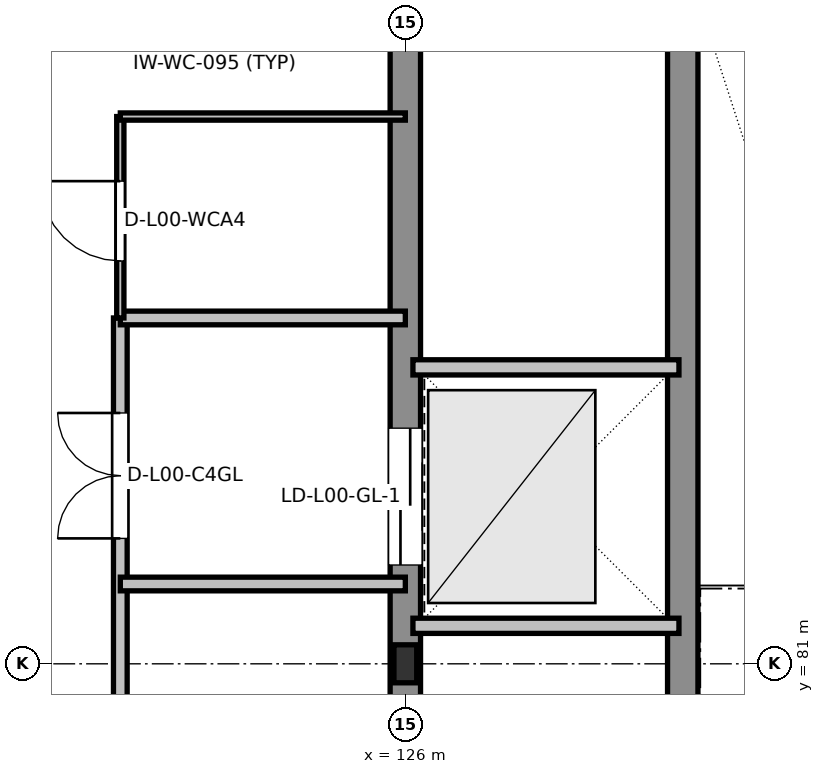
"""IFC4 building model, lengths in metres.
Left out: names, types, materials, properties, quantities, classifications, styles, units other than length and angle.
Written with IfcOpenShell. Run it as: python <this file> out.ifc"""

import sys

from ifc_helpers import new_model, si_unit, direction, frame, frame_2d, origin, origin_2d, place, context, subcontext, project, spatial, rectangle, i_section, extrude, element, fill, save


model = new_model("IFC4")
c1 = context("Model", 3, precision=1e-05, world=origin(), true_north=direction((0.0, 1.0)))
c2 = subcontext(c1, "Body", "Model", "MODEL_VIEW")
j1 = project(units=[si_unit("LENGTHUNIT", "METRE"), si_unit("PLANEANGLEUNIT", "RADIAN")], contexts=[c1])
p1 = place(None, origin())
s1 = spatial("IfcSite", under=j1, at=p1, CompositionType="ELEMENT")
p2 = place(p1, origin())
s2 = spatial("IfcBuilding", under=s1, at=p2, CompositionType="ELEMENT")
p3 = place(p2, origin())
s3 = spatial("IfcBuildingStorey", under=s2, at=p3, CompositionType="ELEMENT", Elevation=0.0)
p4 = place(p3, frame((126.0, 81.0, 0.0), z_axis=(0.0, 0.0, 1.0), x_axis=(1.0, 0.0, 0.0)))
e1 = element("IfcColumn", 1, at=p4, inside=s3, PredefinedType="COLUMN", context=c2, shape_type="SweptSolid", body=[
    extrude(i_section(OverallWidth=0.3, OverallDepth=0.5, WebThickness=0.014, FlangeThickness=0.028, at=origin_2d()), origin(), (0.0, 0.0, 1.0), 5.4),
])
p5 = place(p3, frame((126.0, 90.0, 0.0), z_axis=(0.0, 0.0, 1.0), x_axis=(0.0, -1.0, 0.0)))
e2 = element("IfcWall", 2, at=p5, inside=s3, PredefinedType="SHEAR", context=c2, shape_type="SweptSolid", body=[
    extrude(rectangle(XDim=18.0, YDim=0.4, at=frame_2d((9.0, 0.0))), origin(), (0.0, 0.0, 1.0), 5.16),
])
p6 = place(p5, frame((16.1, 0.0, 0.0)))
e3 = element("IfcOpeningElement", 3, at=p6, cuts=e2, PredefinedType="OPENING", context=c2, shape_type="SweptSolid", body=[
    extrude(rectangle(XDim=1.1, YDim=2.16, at=frame_2d((0.55, 1.08))), frame((0.0, 0.21, 0.0), z_axis=(0.0, -1.0, 0.0), x_axis=(1.0, 0.0, 0.0)), (0.0, 0.0, 1.0), 0.42),
])
p7 = place(p5, frame((13.45, 0.0, 0.0)))
e4 = element("IfcOpeningElement", 4, at=p7, cuts=e2, PredefinedType="OPENING", context=c2, shape_type="SweptSolid", body=[
    extrude(rectangle(XDim=1.2, YDim=2.2, at=frame_2d((0.6, 1.1))), frame((0.0, 0.21, 0.0), z_axis=(0.0, -1.0, 0.0), x_axis=(1.0, 0.0, 0.0)), (0.0, 0.0, 1.0), 0.42),
])
p8 = place(p5, frame((10.65, 0.0, 0.0)))
e5 = element("IfcOpeningElement", 5, at=p8, cuts=e2, PredefinedType="OPENING", context=c2, shape_type="SweptSolid", body=[
    extrude(rectangle(XDim=1.2, YDim=2.2, at=frame_2d((0.6, 1.1))), frame((0.0, 0.21, 0.0), z_axis=(0.0, -1.0, 0.0), x_axis=(1.0, 0.0, 0.0)), (0.0, 0.0, 1.0), 0.42),
])
p9 = place(p5, frame((5.9, 0.0, 0.0)))
e6 = element("IfcOpeningElement", 6, at=p9, cuts=e2, PredefinedType="OPENING", context=c2, shape_type="SweptSolid", body=[
    extrude(rectangle(XDim=1.8, YDim=2.35, at=frame_2d((0.9, 1.175))), frame((0.0, 0.21, 0.0), z_axis=(0.0, -1.0, 0.0), x_axis=(1.0, 0.0, 0.0)), (0.0, 0.0, 1.0), 0.42),
])
p10 = place(p3, frame((129.65, 72.0, 0.0), z_axis=(0.0, 0.0, 1.0), x_axis=(0.0, 1.0, 0.0)))
e7 = element("IfcWall", 7, at=p10, inside=s3, PredefinedType="SHEAR", context=c2, shape_type="SweptSolid", body=[
    extrude(rectangle(XDim=18.0, YDim=0.4, at=frame_2d((9.0, 0.0))), origin(), (0.0, 0.0, 1.0), 5.16),
])
p11 = place(p10, frame((0.7, 0.0, 0.0)))
e8 = element("IfcOpeningElement", 8, at=p11, cuts=e7, PredefinedType="OPENING", context=c2, shape_type="SweptSolid", body=[
    extrude(rectangle(XDim=1.1, YDim=2.16, at=frame_2d((0.55, 1.08))), frame((0.0, 0.21, 0.0), z_axis=(0.0, -1.0, 0.0), x_axis=(1.0, 0.0, 0.0)), (0.0, 0.0, 1.0), 0.42),
])
for number, where, z_axis, x_axis in (
    (9, (126.1, 81.5, 0.0), (0.0, 0.0, 1.0), (1.0, 0.0, 0.0)),
    (10, (126.1, 84.9, 0.0), (0.0, 0.0, 1.0), (1.0, 0.0, 0.0)),
):
    element("IfcWall", number, at=place(p3, frame(where, z_axis=z_axis, x_axis=x_axis)), inside=s3, PredefinedType="PARTITIONING", context=c2, shape_type="SweptSolid", body=[
        extrude(rectangle(XDim=3.5, YDim=0.2, at=frame_2d((1.75, 0.0))), origin(), (0.0, 0.0, 1.0), 5.16),
    ])
p12 = place(p3, frame((122.25, 72.0, 0.0), z_axis=(0.0, 0.0, 1.0), x_axis=(0.0, 1.0, 0.0)))
e11 = element("IfcWall", 11, at=p12, inside=s3, PredefinedType="PARTITIONING", context=c2, shape_type="SweptSolid", body=[
    extrude(rectangle(XDim=13.55, YDim=0.18, at=frame_2d((6.775, 0.0))), origin(), (0.0, 0.0, 1.0), 5.16),
])
p13 = place(p12, frame((0.75, 0.0, 0.0)))
e12 = element("IfcOpeningElement", 12, at=p13, cuts=e11, PredefinedType="OPENING", context=c2, shape_type="SweptSolid", body=[
    extrude(rectangle(XDim=1.1, YDim=2.16, at=frame_2d((0.55, 1.08))), frame((0.0, 0.1, 0.0), z_axis=(0.0, -1.0, 0.0), x_axis=(1.0, 0.0, 0.0)), (0.0, 0.0, 1.0), 0.2),
])
p14 = place(p12, frame((3.2, 0.0, 0.0)))
e13 = element("IfcOpeningElement", 13, at=p14, cuts=e11, PredefinedType="OPENING", context=c2, shape_type="SweptSolid", body=[
    extrude(rectangle(XDim=1.4, YDim=2.2, at=frame_2d((0.7, 1.1))), frame((0.0, 0.1, 0.0), z_axis=(0.0, -1.0, 0.0), x_axis=(1.0, 0.0, 0.0)), (0.0, 0.0, 1.0), 0.2),
])
p15 = place(p12, frame((6.65, 0.0, 0.0)))
e14 = element("IfcOpeningElement", 14, at=p15, cuts=e11, PredefinedType="OPENING", context=c2, shape_type="SweptSolid", body=[
    extrude(rectangle(XDim=1.4, YDim=2.2, at=frame_2d((0.7, 1.1))), frame((0.0, 0.1, 0.0), z_axis=(0.0, -1.0, 0.0), x_axis=(1.0, 0.0, 0.0)), (0.0, 0.0, 1.0), 0.2),
])
p16 = place(p12, frame((10.65, 0.0, 0.0)))
e15 = element("IfcOpeningElement", 15, at=p16, cuts=e11, PredefinedType="OPENING", context=c2, shape_type="SweptSolid", body=[
    extrude(rectangle(XDim=1.65, YDim=2.25, at=frame_2d((0.825, 1.125))), frame((0.0, 0.1, 0.0), z_axis=(0.0, -1.0, 0.0), x_axis=(1.0, 0.0, 0.0)), (0.0, 0.0, 1.0), 0.2),
])
for number, where, z_axis, x_axis in (
    (16, (122.25, 82.05, 0.0), (0.0, 0.0, 1.0), (1.0, 0.0, 0.0)),
    (17, (122.25, 85.55, 0.0), (0.0, 0.0, 1.0), (1.0, 0.0, 0.0)),
):
    element("IfcWall", number, at=place(p3, frame(where, z_axis=z_axis, x_axis=x_axis)), inside=s3, PredefinedType="PARTITIONING", context=c2, shape_type="SweptSolid", body=[
        extrude(rectangle(XDim=3.75, YDim=0.18, at=frame_2d((1.875, 0.0))), origin(), (0.0, 0.0, 1.0), 5.16),
    ])
p17 = place(p3, frame((122.25, 85.55, 0.0), z_axis=(0.0, 0.0, 1.0), x_axis=(0.0, 1.0, 0.0)))
e18 = element("IfcWall", 18, at=p17, inside=s3, PredefinedType="PARTITIONING", context=c2, shape_type="SweptSolid", body=[
    extrude(rectangle(XDim=2.65, YDim=0.095, at=frame_2d((1.325, 0.0))), origin(), (0.0, 0.0, 1.0), 5.16),
])
p18 = place(p17, frame((0.75, 0.0, 0.0)))
e19 = element("IfcOpeningElement", 19, at=p18, cuts=e18, PredefinedType="OPENING", context=c2, shape_type="SweptSolid", body=[
    extrude(rectangle(XDim=1.05, YDim=2.13, at=frame_2d((0.525, 1.065))), frame((0.0, 0.057, 0.0), z_axis=(0.0, -1.0, 0.0), x_axis=(1.0, 0.0, 0.0)), (0.0, 0.0, 1.0), 0.115),
])
p19 = place(p3, frame((122.25, 88.2, 0.0), z_axis=(0.0, 0.0, 1.0), x_axis=(1.0, 0.0, 0.0)))
e20 = element("IfcWall", 20, at=p19, inside=s3, PredefinedType="PARTITIONING", context=c2, shape_type="SweptSolid", body=[
    extrude(rectangle(XDim=3.75, YDim=0.095, at=frame_2d((1.875, 0.0))), origin(), (0.0, 0.0, 1.0), 5.16),
])
p20 = place(p9, origin())
e21 = element("IfcDoor", 21, at=p20, inside=s3, OperationType="DOUBLE_DOOR_SLIDING", PredefinedType="DOOR", context=c2, shape_type="SweptSolid", body=[
    extrude(rectangle(XDim=1.8, YDim=2.35, at=frame_2d((0.9, 1.175))), frame((0.0, 0.025, 0.0), z_axis=(0.0, -1.0, 0.0), x_axis=(1.0, 0.0, 0.0)), (0.0, 0.0, 1.0), 0.05),
])
fill(e6, e21)
p21 = place(p16, origin())
e22 = element("IfcDoor", 22, at=p21, inside=s3, OperationType="DOUBLE_DOOR_SINGLE_SWING", PredefinedType="DOOR", context=c2, shape_type="SweptSolid", body=[
    extrude(rectangle(XDim=1.65, YDim=2.25, at=frame_2d((0.825, 1.125))), frame((0.0, 0.025, 0.0), z_axis=(0.0, -1.0, 0.0), x_axis=(1.0, 0.0, 0.0)), (0.0, 0.0, 1.0), 0.05),
])
fill(e15, e22)
p22 = place(p18, origin())
e23 = element("IfcDoor", 23, at=p22, inside=s3, OperationType="SINGLE_SWING_RIGHT", PredefinedType="DOOR", context=c2, shape_type="SweptSolid", body=[
    extrude(rectangle(XDim=1.05, YDim=2.13, at=frame_2d((0.525, 1.065))), frame((0.0, 0.025, 0.0), z_axis=(0.0, -1.0, 0.0), x_axis=(1.0, 0.0, 0.0)), (0.0, 0.0, 1.0), 0.05),
])
fill(e19, e23)
save(model, sys.argv[1])
